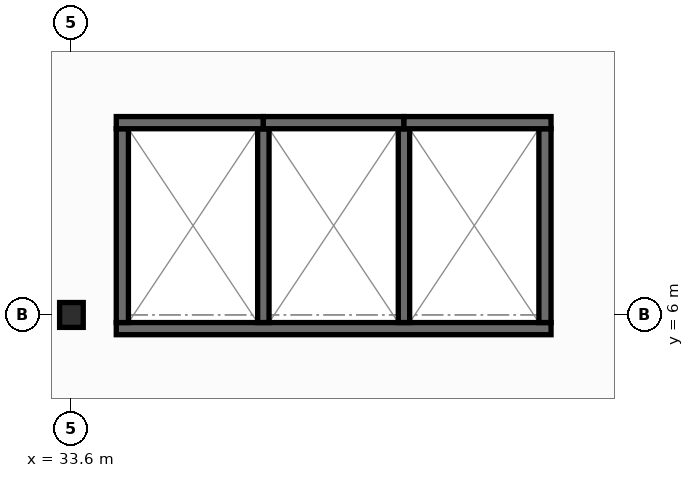
"""IFC4 building model, lengths in metres.
Left out: names, types, materials, properties, quantities, classifications, styles, units other than length and angle.
Written with IfcOpenShell. Run it as: python <this file> out.ifc"""

import sys

from ifc_helpers import new_model, si_unit, direction, frame, frame_2d, origin, origin_2d, place, context, subcontext, project, spatial, rectangle, i_section, extrude, element, save


model = new_model("IFC4")
c1 = context("Model", 3, precision=1e-05, world=origin(), true_north=direction((0.0, 1.0)))
c2 = subcontext(c1, "Body", "Model", "MODEL_VIEW")
j1 = project(units=[si_unit("LENGTHUNIT", "METRE"), si_unit("PLANEANGLEUNIT", "RADIAN")], contexts=[c1])
p1 = place(None, origin())
s1 = spatial("IfcSite", under=j1, at=p1, CompositionType="ELEMENT")
p2 = place(p1, origin())
s2 = spatial("IfcBuilding", under=s1, at=p2, CompositionType="ELEMENT")
p3 = place(p2, frame((0.0, 0.0, 77.8)))
s3 = spatial("IfcBuildingStorey", under=s2, at=p3, CompositionType="ELEMENT", Elevation=77.8)
p4 = place(p3, frame((33.6, 6.0, 0.0), z_axis=(0.0, 0.0, 1.0), x_axis=(1.0, 0.0, 0.0)))
e1 = element("IfcColumn", 1, at=p4, inside=s3, PredefinedType="COLUMN", context=c2, shape_type="SweptSolid", body=[
    extrude(i_section(OverallWidth=0.311, OverallDepth=0.327, WebThickness=0.016, FlangeThickness=0.025, FilletRadius=0.017, at=origin_2d()), origin(), (0.0, 0.0, 1.0), 3.95),
])
p5 = place(p3, frame((34.19, 5.82, 0.0), z_axis=(0.0, 0.0, 1.0), x_axis=(1.0, 0.0, 0.0)))
e2 = element("IfcWall", 2, at=p5, inside=s3, PredefinedType="SHEAR", context=c2, shape_type="SweptSolid", body=[
    extrude(rectangle(XDim=5.72, YDim=0.16, at=frame_2d((2.86, 0.0))), origin(), (0.0, 0.0, 1.0), 3.71),
])
for number, where, z_axis, x_axis in (
    (3, (34.27, 5.9, 0.0), (0.0, 0.0, 1.0), (0.0, 1.0, 0.0)),
    (4, (39.83, 5.9, 0.0), (0.0, 0.0, 1.0), (0.0, 1.0, 0.0)),
):
    element("IfcWall", number, at=place(p3, frame(where, z_axis=z_axis, x_axis=x_axis)), inside=s3, PredefinedType="SHEAR", context=c2, shape_type="SweptSolid", body=[
        extrude(rectangle(XDim=2.55, YDim=0.16, at=frame_2d((1.275, 0.0))), origin(), (0.0, 0.0, 1.0), 3.71),
    ])
for number, where, z_axis, x_axis in (
    (5, (36.125, 5.9, 0.0), (0.0, 0.0, 1.0), (0.0, 1.0, 0.0)),
    (6, (37.975, 5.9, 0.0), (0.0, 0.0, 1.0), (0.0, 1.0, 0.0)),
):
    element("IfcWall", number, at=place(p3, frame(where, z_axis=z_axis, x_axis=x_axis)), inside=s3, PredefinedType="SHEAR", context=c2, shape_type="SweptSolid", body=[
        extrude(rectangle(XDim=2.55, YDim=0.15, at=frame_2d((1.275, 0.0))), origin(), (0.0, 0.0, 1.0), 3.71),
    ])
p6 = place(p3, frame((34.19, 8.53, 0.0), z_axis=(0.0, 0.0, 1.0), x_axis=(1.0, 0.0, 0.0)))
e7 = element("IfcWall", 7, at=p6, inside=s3, PredefinedType="SHEAR", context=c2, shape_type="SweptSolid", body=[
    extrude(rectangle(XDim=1.935, YDim=0.16, at=frame_2d((0.968, 0.0))), origin(), (0.0, 0.0, 1.0), 3.71),
])
p7 = place(p3, frame((36.125, 8.53, 0.0), z_axis=(0.0, 0.0, 1.0), x_axis=(1.0, 0.0, 0.0)))
e8 = element("IfcWall", 8, at=p7, inside=s3, PredefinedType="SHEAR", context=c2, shape_type="SweptSolid", body=[
    extrude(rectangle(XDim=1.85, YDim=0.16, at=frame_2d((0.925, 0.0))), origin(), (0.0, 0.0, 1.0), 3.71),
])
p8 = place(p3, frame((37.975, 8.53, 0.0), z_axis=(0.0, 0.0, 1.0), x_axis=(1.0, 0.0, 0.0)))
e9 = element("IfcWall", 9, at=p8, inside=s3, PredefinedType="SHEAR", context=c2, shape_type="SweptSolid", body=[
    extrude(rectangle(XDim=1.935, YDim=0.16, at=frame_2d((0.967, 0.0))), origin(), (0.0, 0.0, 1.0), 3.71),
])
save(model, sys.argv[1])
